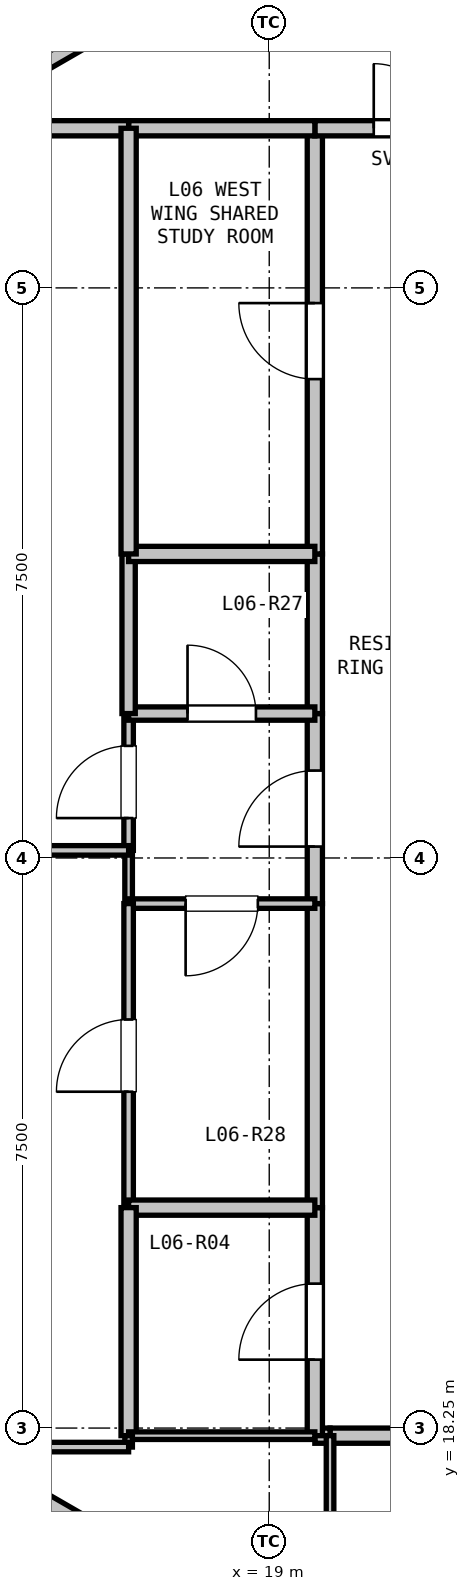
"""IFC4 building model, lengths in metres.
Left out: names, types, materials, properties, quantities, classifications, styles, units other than length and angle.
Written with IfcOpenShell. Run it as: python <this file> out.ifc"""

import sys

from ifc_helpers import new_model, si_unit, direction, frame, frame_2d, origin, place, context, subcontext, project, spatial, rectangle, extrude, element, fill, save


model = new_model("IFC4")
c1 = context("Model", 3, precision=1e-05, world=origin(), true_north=direction((0.0, 1.0)))
c2 = subcontext(c1, "Body", "Model", "MODEL_VIEW")
j1 = project(units=[si_unit("LENGTHUNIT", "METRE"), si_unit("PLANEANGLEUNIT", "RADIAN")], contexts=[c1])
p1 = place(None, origin())
s1 = spatial("IfcSite", under=j1, at=p1, CompositionType="ELEMENT")
p2 = place(p1, origin())
s2 = spatial("IfcBuilding", under=s1, at=p2, CompositionType="ELEMENT")
p3 = place(p2, frame((0.0, 0.0, 25.8)))
s3 = spatial("IfcBuildingStorey", under=s2, at=p3, CompositionType="ELEMENT", Elevation=25.8)
for number, where, z_axis, x_axis in (
    (1, (15.008, 35.611, 0.0), (0.0, 0.0, 1.0), (0.866, 0.5, 0.0)),
    (2, (16.48, 17.039, 0.0), (0.0, 0.0, 1.0), (-0.866, 0.5, 0.0)),
):
    element("IfcWall", number, at=place(p3, frame(where, z_axis=z_axis, x_axis=x_axis)), inside=s3, PredefinedType="PARAPET", context=c2, shape_type="SweptSolid", body=[
        extrude(rectangle(XDim=1.7, YDim=0.2, at=frame_2d((0.85, 0.0))), origin(), (0.0, 0.0, 1.0), 2.66),
    ])
p4 = place(p3, frame((22.6, 18.15, 0.0), z_axis=(0.0, 0.0, 1.0), x_axis=(-1.0, 0.0, 0.0)))
e3 = element("IfcWall", 3, at=p4, inside=s3, PredefinedType="PARTITIONING", context=c2, shape_type="SweptSolid", body=[
    extrude(rectangle(XDim=2.8, YDim=0.2, at=frame_2d((1.4, 0.0))), origin(), (0.0, 0.0, 1.0), 3.04),
])
p5 = place(p4, frame((0.9, 0.0, 0.0)))
e4 = element("IfcOpeningElement", 4, at=p5, cuts=e3, PredefinedType="OPENING", context=c2, shape_type="SweptSolid", body=[
    extrude(rectangle(XDim=1.0, YDim=2.15, at=frame_2d((0.5, 1.075))), frame((0.0, 0.11, 0.0), z_axis=(0.0, -1.0, 0.0), x_axis=(1.0, 0.0, 0.0)), (0.0, 0.0, 1.0), 0.22),
])
p6 = place(p3, frame((19.8, 18.15, 0.0), z_axis=(0.0, 0.0, 1.0), x_axis=(-1.0, 0.0, 0.0)))
e5 = element("IfcWall", 5, at=p6, inside=s3, PredefinedType="PARTITIONING", context=c2, shape_type="SweptSolid", body=[
    extrude(rectangle(XDim=0.2, YDim=0.2, at=frame_2d((0.1, 0.0))), origin(), (0.0, 0.0, 1.0), 3.04),
])
p7 = place(p3, frame((19.6, 18.15, 0.0), z_axis=(0.0, 0.0, 1.0), x_axis=(0.0, 1.0, 0.0)))
e6 = element("IfcWall", 6, at=p7, inside=s3, PredefinedType="PARTITIONING", context=c2, shape_type="SweptSolid", body=[
    extrude(rectangle(XDim=3.0, YDim=0.2, at=frame_2d((1.5, 0.0))), origin(), (0.0, 0.0, 1.0), 2.337),
])
p8 = place(p7, frame((1.0, 0.0, 0.0)))
e7 = element("IfcOpeningElement", 7, at=p8, cuts=e6, PredefinedType="OPENING", context=c2, shape_type="SweptSolid", body=[
    extrude(rectangle(XDim=1.0, YDim=2.15, at=frame_2d((0.5, 1.075))), frame((0.0, 0.11, 0.0), z_axis=(0.0, -1.0, 0.0), x_axis=(1.0, 0.0, 0.0)), (0.0, 0.0, 1.0), 0.22),
])
p9 = place(p3, frame((19.6, 21.15, 0.0), z_axis=(0.0, 0.0, 1.0), x_axis=(0.0, 1.0, 0.0)))
e8 = element("IfcWall", 8, at=p9, inside=s3, PredefinedType="PARTITIONING", context=c2, shape_type="SweptSolid", body=[
    extrude(rectangle(XDim=4.0, YDim=0.2, at=frame_2d((2.0, 0.0))), origin(), (0.0, 0.0, 1.0), 3.04),
])
p10 = place(p3, frame((19.6, 25.15, 0.0), z_axis=(0.0, 0.0, 1.0), x_axis=(0.0, 1.0, 0.0)))
e9 = element("IfcWall", 9, at=p10, inside=s3, PredefinedType="PARTITIONING", context=c2, shape_type="SweptSolid", body=[
    extrude(rectangle(XDim=2.5, YDim=0.2, at=frame_2d((1.25, 0.0))), origin(), (0.0, 0.0, 1.0), 3.04),
])
p11 = place(p10, frame((0.75, 0.0, 0.0)))
e10 = element("IfcOpeningElement", 10, at=p11, cuts=e9, PredefinedType="OPENING", context=c2, shape_type="SweptSolid", body=[
    extrude(rectangle(XDim=1.0, YDim=2.15, at=frame_2d((0.5, 1.075))), frame((0.0, 0.11, 0.0), z_axis=(0.0, -1.0, 0.0), x_axis=(1.0, 0.0, 0.0)), (0.0, 0.0, 1.0), 0.22),
])
p12 = place(p3, frame((19.6, 27.65, 0.0), z_axis=(0.0, 0.0, 1.0), x_axis=(0.0, 1.0, 0.0)))
e11 = element("IfcWall", 11, at=p12, inside=s3, PredefinedType="PARTITIONING", context=c2, shape_type="SweptSolid", body=[
    extrude(rectangle(XDim=2.1, YDim=0.2, at=frame_2d((1.05, 0.0))), origin(), (0.0, 0.0, 1.0), 3.04),
])
p13 = place(p3, frame((19.6, 29.75, 0.0), z_axis=(0.0, 0.0, 1.0), x_axis=(0.0, 1.0, 0.0)))
e12 = element("IfcWall", 12, at=p13, inside=s3, PredefinedType="PARTITIONING", context=c2, shape_type="SweptSolid", body=[
    extrude(rectangle(XDim=5.6, YDim=0.2, at=frame_2d((2.8, 0.0))), origin(), (0.0, 0.0, 1.0), 2.337),
])
p14 = place(p13, frame((2.3, 0.0, 0.0)))
e13 = element("IfcOpeningElement", 13, at=p14, cuts=e12, PredefinedType="OPENING", context=c2, shape_type="SweptSolid", body=[
    extrude(rectangle(XDim=1.0, YDim=2.15, at=frame_2d((0.5, 1.075))), frame((0.0, 0.11, 0.0), z_axis=(0.0, -1.0, 0.0), x_axis=(1.0, 0.0, 0.0)), (0.0, 0.0, 1.0), 0.22),
])
p15 = place(p3, frame((19.6, 35.35, 0.0), z_axis=(0.0, 0.0, 1.0), x_axis=(1.0, 0.0, 0.0)))
e14 = element("IfcWall", 14, at=p15, inside=s3, PredefinedType="PARTITIONING", context=c2, shape_type="SweptSolid", body=[
    extrude(rectangle(XDim=2.4, YDim=0.2, at=frame_2d((1.2, 0.0))), origin(), (0.0, 0.0, 1.0), 3.04),
])
p16 = place(p15, frame((0.775, 0.0, 0.0)))
e15 = element("IfcOpeningElement", 15, at=p16, cuts=e14, PredefinedType="OPENING", context=c2, shape_type="SweptSolid", body=[
    extrude(rectangle(XDim=0.85, YDim=2.1, at=frame_2d((0.425, 1.05))), frame((0.0, 0.11, 0.0), z_axis=(0.0, -1.0, 0.0), x_axis=(1.0, 0.0, 0.0)), (0.0, 0.0, 1.0), 0.22),
])
p17 = place(p3, frame((17.15, 25.15, 0.0), z_axis=(0.0, 0.0, 1.0), x_axis=(0.0, 1.0, 0.0)))
e16 = element("IfcWall", 16, at=p17, inside=s3, PredefinedType="PARTITIONING", context=c2, shape_type="SweptSolid", body=[
    extrude(rectangle(XDim=0.7, YDim=0.1, at=frame_2d((0.35, 0.0))), origin(), (0.0, 0.0, 1.0), 3.04),
])
p18 = place(p3, frame((17.15, 25.85, 0.0), z_axis=(0.0, 0.0, 1.0), x_axis=(0.0, 1.0, 0.0)))
e17 = element("IfcWall", 17, at=p18, inside=s3, PredefinedType="PARTITIONING", context=c2, shape_type="SweptSolid", body=[
    extrude(rectangle(XDim=1.8, YDim=0.125, at=frame_2d((0.9, 0.0))), origin(), (0.0, 0.0, 1.0), 3.04),
])
p19 = place(p18, frame((0.425, 0.0, 0.0)))
e18 = element("IfcOpeningElement", 18, at=p19, cuts=e17, PredefinedType="OPENING", context=c2, shape_type="SweptSolid", body=[
    extrude(rectangle(XDim=0.95, YDim=2.1, at=frame_2d((0.475, 1.05))), frame((0.0, 0.073, 0.0), z_axis=(0.0, -1.0, 0.0), x_axis=(1.0, 0.0, 0.0)), (0.0, 0.0, 1.0), 0.145),
])
p20 = place(p3, frame((17.15, 27.65, 0.0), z_axis=(0.0, 0.0, 1.0), x_axis=(1.0, 0.0, 0.0)))
e19 = element("IfcWall", 19, at=p20, inside=s3, PredefinedType="PLUMBINGWALL", context=c2, shape_type="SweptSolid", body=[
    extrude(rectangle(XDim=2.45, YDim=0.175, at=frame_2d((1.225, 0.0))), origin(), (0.0, 0.0, 1.0), 3.04),
])
p21 = place(p20, frame((0.775, 0.0, 0.0)))
e20 = element("IfcOpeningElement", 20, at=p21, cuts=e19, PredefinedType="OPENING", context=c2, shape_type="SweptSolid", body=[
    extrude(rectangle(XDim=0.9, YDim=2.1, at=frame_2d((0.45, 1.05))), frame((0.0, 0.097, 0.0), z_axis=(0.0, -1.0, 0.0), x_axis=(1.0, 0.0, 0.0)), (0.0, 0.0, 1.0), 0.195),
])
p22 = place(p3, frame((19.6, 25.15, 0.0), z_axis=(0.0, 0.0, 1.0), x_axis=(-1.0, 0.0, 0.0)))
e21 = element("IfcWall", 21, at=p22, inside=s3, PredefinedType="PARTITIONING", context=c2, shape_type="SweptSolid", body=[
    extrude(rectangle(XDim=2.45, YDim=0.125, at=frame_2d((1.225, 0.0))), origin(), (0.0, 0.0, 1.0), 3.04),
])
p23 = place(p22, frame((0.75, 0.0, 0.0)))
e22 = element("IfcOpeningElement", 22, at=p23, cuts=e21, PredefinedType="OPENING", context=c2, shape_type="SweptSolid", body=[
    extrude(rectangle(XDim=0.95, YDim=2.1, at=frame_2d((0.475, 1.05))), frame((0.0, 0.073, 0.0), z_axis=(0.0, -1.0, 0.0), x_axis=(1.0, 0.0, 0.0)), (0.0, 0.0, 1.0), 0.145),
])
p24 = place(p3, frame((17.15, 27.65, 0.0), z_axis=(0.0, 0.0, 1.0), x_axis=(0.0, 1.0, 0.0)))
e23 = element("IfcWall", 23, at=p24, inside=s3, PredefinedType="PLUMBINGWALL", context=c2, shape_type="SweptSolid", body=[
    extrude(rectangle(XDim=2.1, YDim=0.175, at=frame_2d((1.05, 0.0))), origin(), (0.0, 0.0, 1.0), 3.04),
])
p25 = place(p3, frame((17.15, 29.75, 0.0), z_axis=(0.0, 0.0, 1.0), x_axis=(1.0, 0.0, 0.0)))
e24 = element("IfcWall", 24, at=p25, inside=s3, PredefinedType="PARTITIONING", context=c2, shape_type="SweptSolid", body=[
    extrude(rectangle(XDim=2.45, YDim=0.2, at=frame_2d((1.225, 0.0))), origin(), (0.0, 0.0, 1.0), 3.04),
])
p26 = place(p3, frame((17.15, 21.15, 0.0), z_axis=(0.0, 0.0, 1.0), x_axis=(0.0, 1.0, 0.0)))
e25 = element("IfcWall", 25, at=p26, inside=s3, PredefinedType="PARTITIONING", context=c2, shape_type="SweptSolid", body=[
    extrude(rectangle(XDim=4.0, YDim=0.125, at=frame_2d((2.0, 0.0))), origin(), (0.0, 0.0, 1.0), 2.337),
])
p27 = place(p26, frame((1.525, 0.0, 0.0)))
e26 = element("IfcOpeningElement", 26, at=p27, cuts=e25, PredefinedType="OPENING", context=c2, shape_type="SweptSolid", body=[
    extrude(rectangle(XDim=0.95, YDim=2.1, at=frame_2d((0.475, 1.05))), frame((0.0, 0.073, 0.0), z_axis=(0.0, -1.0, 0.0), x_axis=(1.0, 0.0, 0.0)), (0.0, 0.0, 1.0), 0.145),
])
p28 = place(p3, frame((19.6, 21.15, 0.0), z_axis=(0.0, 0.0, 1.0), x_axis=(-1.0, 0.0, 0.0)))
e27 = element("IfcWall", 27, at=p28, inside=s3, PredefinedType="PARTITIONING", context=c2, shape_type="SweptSolid", body=[
    extrude(rectangle(XDim=2.45, YDim=0.2, at=frame_2d((1.225, 0.0))), origin(), (0.0, 0.0, 1.0), 2.337),
])
p29 = place(p3, frame((19.6, 35.35, 0.0), z_axis=(0.0, 0.0, 1.0), x_axis=(-1.0, 0.0, 0.0)))
e28 = element("IfcWall", 28, at=p29, inside=s3, PredefinedType="PARTITIONING", context=c2, shape_type="SweptSolid", body=[
    extrude(rectangle(XDim=2.45, YDim=0.2, at=frame_2d((1.225, 0.0))), origin(), (0.0, 0.0, 1.0), 3.04),
])
p30 = place(p3, frame((17.15, 35.35, 0.0), z_axis=(0.0, 0.0, 1.0), x_axis=(-1.0, 0.0, 0.0)))
e29 = element("IfcWall", 29, at=p30, inside=s3, PredefinedType="PARTITIONING", context=c2, shape_type="SweptSolid", body=[
    extrude(rectangle(XDim=1.15, YDim=0.2, at=frame_2d((0.575, 0.0))), origin(), (0.0, 0.0, 1.0), 3.04),
])
p31 = place(p3, frame((17.15, 29.75, 0.0), z_axis=(0.0, 0.0, 1.0), x_axis=(0.0, 1.0, 0.0)))
e30 = element("IfcWall", 30, at=p31, inside=s3, PredefinedType="PARTITIONING", context=c2, shape_type="SweptSolid", body=[
    extrude(rectangle(XDim=5.6, YDim=0.2, at=frame_2d((2.8, 0.0))), origin(), (0.0, 0.0, 1.0), 2.337),
])
p32 = place(p3, frame((17.15, 18.15, 0.0), z_axis=(0.0, 0.0, 1.0), x_axis=(0.0, 1.0, 0.0)))
e31 = element("IfcWall", 31, at=p32, inside=s3, PredefinedType="PARTITIONING", context=c2, shape_type="SweptSolid", body=[
    extrude(rectangle(XDim=3.0, YDim=0.2, at=frame_2d((1.5, 0.0))), origin(), (0.0, 0.0, 1.0), 3.04),
])
p33 = place(p3, frame((19.6, 18.15, 0.0), z_axis=(0.0, 0.0, 1.0), x_axis=(-1.0, 0.0, 0.0)))
e32 = element("IfcWall", 32, at=p33, inside=s3, PredefinedType="PARTITIONING", context=c2, shape_type="SweptSolid", body=[
    extrude(rectangle(XDim=2.45, YDim=0.1, at=frame_2d((1.225, 0.0))), origin(), (0.0, 0.0, 1.0), 3.04),
])
p34 = place(p3, frame((19.8, 14.956, 0.0), z_axis=(0.0, 0.0, 1.0), x_axis=(0.0, 1.0, 0.0)))
e33 = element("IfcWall", 33, at=p34, inside=s3, PredefinedType="PARTITIONING", context=c2, shape_type="SweptSolid", body=[
    extrude(rectangle(XDim=3.194, YDim=0.1, at=frame_2d((1.597, 0.0))), origin(), (0.0, 0.0, 1.0), 2.365),
])
p35 = place(p3, frame((17.15, 25.85, 0.0), z_axis=(0.0, 0.0, 1.0), x_axis=(-1.0, 0.0, 0.0)))
e34 = element("IfcWall", 34, at=p35, inside=s3, PredefinedType="PARTITIONING", context=c2, shape_type="SweptSolid", body=[
    extrude(rectangle(XDim=6.67, YDim=0.125, at=frame_2d((3.335, 0.0))), origin(), (0.0, 0.0, 1.0), 3.04),
])
p36 = place(p35, frame((2.86, 0.0, 0.0)))
e35 = element("IfcOpeningElement", 35, at=p36, cuts=e34, PredefinedType="OPENING", context=c2, shape_type="SweptSolid", body=[
    extrude(rectangle(XDim=0.95, YDim=2.1, at=frame_2d((0.475, 1.05))), frame((0.0, 0.073, 0.0), z_axis=(0.0, -1.0, 0.0), x_axis=(1.0, 0.0, 0.0)), (0.0, 0.0, 1.0), 0.145),
])
p37 = place(p3, frame((17.15, 18.15, 0.0), z_axis=(0.0, 0.0, 1.0), x_axis=(0.0, -1.0, 0.0)))
e36 = element("IfcWall", 36, at=p37, inside=s3, PredefinedType="PARTITIONING", context=c2, shape_type="SweptSolid", body=[
    extrude(rectangle(XDim=0.15, YDim=0.1, at=frame_2d((0.075, 0.0))), origin(), (0.0, 0.0, 1.0), 3.04),
])
p38 = place(p3, frame((17.15, 18.0, 0.0), z_axis=(0.0, 0.0, 1.0), x_axis=(-1.0, 0.0, 0.0)))
e37 = element("IfcWall", 37, at=p38, inside=s3, PredefinedType="PARTITIONING", context=c2, shape_type="SweptSolid", body=[
    extrude(rectangle(XDim=2.401, YDim=0.125, at=frame_2d((1.2, 0.0))), origin(), (0.0, 0.0, 1.0), 2.365),
])
p39 = place(p11, origin())
e38 = element("IfcDoor", 38, at=p39, inside=s3, OperationType="SINGLE_SWING_LEFT", PredefinedType="DOOR", context=c2, shape_type="SweptSolid", body=[
    extrude(rectangle(XDim=1.0, YDim=2.15, at=frame_2d((0.5, 1.075))), frame((0.0, 0.025, 0.0), z_axis=(0.0, -1.0, 0.0), x_axis=(1.0, 0.0, 0.0)), (0.0, 0.0, 1.0), 0.05),
])
fill(e10, e38)
p40 = place(p16, origin())
e39 = element("IfcDoor", 39, at=p40, inside=s3, OperationType="SINGLE_SWING_LEFT", PredefinedType="DOOR", context=c2, shape_type="SweptSolid", body=[
    extrude(rectangle(XDim=0.85, YDim=2.1, at=frame_2d((0.425, 1.05))), frame((0.0, 0.025, 0.0), z_axis=(0.0, -1.0, 0.0), x_axis=(1.0, 0.0, 0.0)), (0.0, 0.0, 1.0), 0.05),
])
fill(e15, e39)
p41 = place(p14, origin())
e40 = element("IfcDoor", 40, at=p41, inside=s3, OperationType="SINGLE_SWING_RIGHT", PredefinedType="DOOR", context=c2, shape_type="SweptSolid", body=[
    extrude(rectangle(XDim=1.0, YDim=2.15, at=frame_2d((0.5, 1.075))), frame((0.0, 0.025, 0.0), z_axis=(0.0, -1.0, 0.0), x_axis=(1.0, 0.0, 0.0)), (0.0, 0.0, 1.0), 0.05),
])
fill(e13, e40)
p42 = place(p8, origin())
e41 = element("IfcDoor", 41, at=p42, inside=s3, OperationType="SINGLE_SWING_LEFT", PredefinedType="DOOR", context=c2, shape_type="SweptSolid", body=[
    extrude(rectangle(XDim=1.0, YDim=2.15, at=frame_2d((0.5, 1.075))), frame((0.0, 0.025, 0.0), z_axis=(0.0, -1.0, 0.0), x_axis=(1.0, 0.0, 0.0)), (0.0, 0.0, 1.0), 0.05),
])
fill(e7, e41)
p43 = place(p21, origin())
e42 = element("IfcDoor", 42, at=p43, inside=s3, OperationType="SINGLE_SWING_LEFT", PredefinedType="DOOR", context=c2, shape_type="SweptSolid", body=[
    extrude(rectangle(XDim=0.9, YDim=2.1, at=frame_2d((0.45, 1.05))), frame((0.0, 0.025, 0.0), z_axis=(0.0, -1.0, 0.0), x_axis=(1.0, 0.0, 0.0)), (0.0, 0.0, 1.0), 0.05),
])
fill(e20, e42)
p44 = place(p23, origin())
e43 = element("IfcDoor", 43, at=p44, inside=s3, OperationType="SINGLE_SWING_RIGHT", PredefinedType="DOOR", context=c2, shape_type="SweptSolid", body=[
    extrude(rectangle(XDim=0.95, YDim=2.1, at=frame_2d((0.475, 1.05))), frame((0.0, 0.025, 0.0), z_axis=(0.0, -1.0, 0.0), x_axis=(1.0, 0.0, 0.0)), (0.0, 0.0, 1.0), 0.05),
])
fill(e22, e43)
p45 = place(p19, origin())
e44 = element("IfcDoor", 44, at=p45, inside=s3, OperationType="SINGLE_SWING_LEFT", PredefinedType="DOOR", context=c2, shape_type="SweptSolid", body=[
    extrude(rectangle(XDim=0.95, YDim=2.1, at=frame_2d((0.475, 1.05))), frame((0.0, 0.025, 0.0), z_axis=(0.0, -1.0, 0.0), x_axis=(1.0, 0.0, 0.0)), (0.0, 0.0, 1.0), 0.05),
])
fill(e18, e44)
p46 = place(p27, origin())
e45 = element("IfcDoor", 45, at=p46, inside=s3, OperationType="SINGLE_SWING_LEFT", PredefinedType="DOOR", context=c2, shape_type="SweptSolid", body=[
    extrude(rectangle(XDim=0.95, YDim=2.1, at=frame_2d((0.475, 1.05))), frame((0.0, 0.025, 0.0), z_axis=(0.0, -1.0, 0.0), x_axis=(1.0, 0.0, 0.0)), (0.0, 0.0, 1.0), 0.05),
])
fill(e26, e45)
save(model, sys.argv[1])
